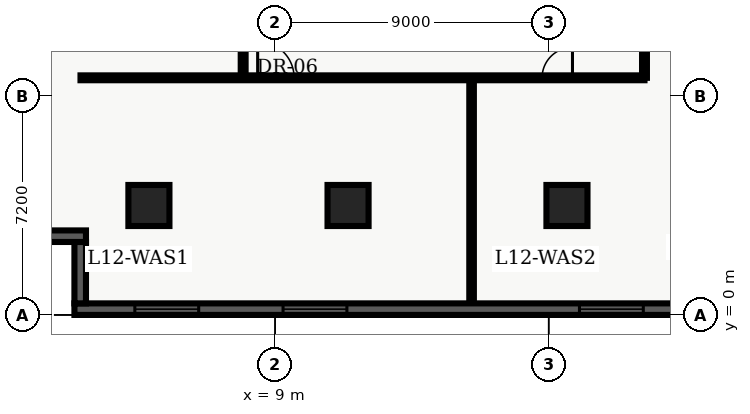
"""IFC4 building model, lengths in metres.
Left out: names, types, materials, properties, quantities, classifications, styles, units other than length and angle.
Written with IfcOpenShell. Run it as: python <this file> out.ifc"""

import sys

from ifc_helpers import new_model, entity, si_unit, converted_unit, direction, frame, origin_with_axes, origin_2d_with_axis, place, context, subcontext, project, spatial, polyline, rectangle, outline, extrude, element, fill, save


model = new_model("IFC4")
c1 = context("Model", 3, precision=1e-05, world=origin_with_axes(), true_north=direction((0.0, 1.0)))
c2 = subcontext(c1, "Body", "Model", "MODEL_VIEW")
j1 = project(units=[si_unit("LENGTHUNIT", "METRE"), converted_unit("PLANEANGLEUNIT", "DEGREE", entity("IfcPlaneAngleMeasure", 0.017), si_unit("PLANEANGLEUNIT", "RADIAN"), dimensions=[0, 0, 0, 0, 0, 0, 0])], contexts=[c1])
p1 = place(None, origin_with_axes())
s1 = spatial("IfcSite", under=j1, at=p1, CompositionType="ELEMENT")
p2 = place(p1, origin_with_axes())
s2 = spatial("IfcBuilding", under=s1, at=p2, CompositionType="ELEMENT")
p3 = place(p2, frame((0.0, 0.0, 52.2), z_axis=(0.0, 0.0, 1.0), x_axis=(1.0, 0.0, 0.0)))
s3 = spatial("IfcBuildingStorey", under=s2, at=p3, CompositionType="ELEMENT", Elevation=52.2)
for number, where, z_axis, x_axis in (
    (1, (11.4, 3.6, 0.0), (0.0, 0.0, 1.0), (1.0, 0.0, 0.0)),
    (2, (18.6, 3.6, 0.0), (0.0, 0.0, 1.0), (1.0, 0.0, 0.0)),
    (3, (4.85, 3.6, 0.0), (0.0, 0.0, 1.0), (1.0, 0.0, 0.0)),
):
    element("IfcColumn", number, at=place(p3, frame(where, z_axis=z_axis, x_axis=x_axis)), inside=s3, PredefinedType="COLUMN", context=c2, shape_type="SweptSolid", body=[
        extrude(rectangle(XDim=1.35, YDim=1.35, at=origin_2d_with_axis()), origin_with_axes(), (0.0, 0.0, 1.0), 3.9),
    ])
p4 = place(p3, frame((2.6, 7.8, 0.0), z_axis=(0.0, 0.0, 1.0), x_axis=(1.0, 0.0, 0.0)))
e4 = element("IfcWall", 4, at=p4, inside=s3, PredefinedType="PARTITIONING", context=c2, shape_type="SweptSolid", body=[
    extrude(outline(polyline([(0.0, -0.08), (18.55, -0.08), (18.55, 0.08), (0.0, 0.08), (0.0, -0.08)])), origin_with_axes(), (0.0, 0.0, 1.0), 2.7),
])
p5 = place(p4, frame((6.426, 0.0, 0.0), z_axis=(0.0, 0.0, 1.0), x_axis=(1.0, 0.0, 0.0)))
e5 = element("IfcOpeningElement", 5, at=p5, cuts=e4, PredefinedType="OPENING", context=c2, shape_type="SweptSolid", body=[
    extrude(rectangle(XDim=1.2, YDim=0.18, at=origin_2d_with_axis()), origin_with_axes(), (0.0, 0.0, 1.0), 2.2),
])
p6 = place(p4, frame((15.681, 0.0, 0.0), z_axis=(0.0, 0.0, 1.0), x_axis=(1.0, 0.0, 0.0)))
e6 = element("IfcOpeningElement", 6, at=p6, cuts=e4, PredefinedType="OPENING", context=c2, shape_type="SweptSolid", body=[
    extrude(rectangle(XDim=1.0, YDim=0.18, at=origin_2d_with_axis()), origin_with_axes(), (0.0, 0.0, 1.0), 2.15),
])
p7 = place(p3, frame((21.15, 7.8, 0.0), z_axis=(0.0, 0.0, 1.0), x_axis=(0.0, 1.0, 0.0)))
e7 = element("IfcWall", 7, at=p7, inside=s3, PredefinedType="PARTITIONING", context=c2, shape_type="SweptSolid", body=[
    extrude(outline(polyline([(0.0, -0.08), (32.7, -0.08), (32.7, 0.08), (0.0, 0.08), (0.0, -0.08)])), origin_with_axes(), (0.0, 0.0, 1.0), 2.7),
])
p8 = place(p7, frame((6.675, 0.0, 0.0), z_axis=(0.0, 0.0, 1.0), x_axis=(1.0, 0.0, 0.0)))
e8 = element("IfcOpeningElement", 8, at=p8, cuts=e7, PredefinedType="OPENING", context=c2, shape_type="SweptSolid", body=[
    extrude(rectangle(XDim=1.05, YDim=0.18, at=origin_2d_with_axis()), origin_with_axes(), (0.0, 0.0, 1.0), 2.15),
])
p9 = place(p3, frame((7.95, 7.8, 0.0), z_axis=(0.0, 0.0, 1.0), x_axis=(0.0, 1.0, 0.0)))
e9 = element("IfcWall", 9, at=p9, inside=s3, PredefinedType="PARTITIONING", context=c2, shape_type="SweptSolid", body=[
    extrude(outline(polyline([(0.0, -0.08), (32.7, -0.08), (32.7, 0.08), (0.0, 0.08), (0.0, -0.08)])), origin_with_axes(), (0.0, 0.0, 1.0), 2.7),
])
p10 = place(p9, frame((2.288, 0.0, 0.0), z_axis=(0.0, 0.0, 1.0), x_axis=(1.0, 0.0, 0.0)))
e10 = element("IfcOpeningElement", 10, at=p10, cuts=e9, PredefinedType="OPENING", context=c2, shape_type="SweptSolid", body=[
    extrude(rectangle(XDim=1.0, YDim=0.18, at=origin_2d_with_axis()), origin_with_axes(), (0.0, 0.0, 1.0), 2.15),
])
p11 = place(p9, frame((6.971, 0.0, 0.0), z_axis=(0.0, 0.0, 1.0), x_axis=(1.0, 0.0, 0.0)))
e11 = element("IfcOpeningElement", 11, at=p11, cuts=e9, PredefinedType="OPENING", context=c2, shape_type="SweptSolid", body=[
    extrude(rectangle(XDim=1.0, YDim=0.18, at=origin_2d_with_axis()), origin_with_axes(), (0.0, 0.0, 1.0), 2.15),
])
p12 = place(p9, frame((12.598, 0.0, 0.0), z_axis=(0.0, 0.0, 1.0), x_axis=(1.0, 0.0, 0.0)))
e12 = element("IfcOpeningElement", 12, at=p12, cuts=e9, PredefinedType="OPENING", context=c2, shape_type="SweptSolid", body=[
    extrude(rectangle(XDim=1.0, YDim=0.18, at=origin_2d_with_axis()), origin_with_axes(), (0.0, 0.0, 1.0), 2.15),
])
p13 = place(p9, frame((19.386, 0.0, 0.0), z_axis=(0.0, 0.0, 1.0), x_axis=(1.0, 0.0, 0.0)))
e13 = element("IfcOpeningElement", 13, at=p13, cuts=e9, PredefinedType="OPENING", context=c2, shape_type="SweptSolid", body=[
    extrude(rectangle(XDim=1.0, YDim=0.18, at=origin_2d_with_axis()), origin_with_axes(), (0.0, 0.0, 1.0), 2.15),
])
p14 = place(p9, frame((27.82, 0.0, 0.0), z_axis=(0.0, 0.0, 1.0), x_axis=(1.0, 0.0, 0.0)))
e14 = element("IfcOpeningElement", 14, at=p14, cuts=e9, PredefinedType="OPENING", context=c2, shape_type="SweptSolid", body=[
    extrude(rectangle(XDim=1.0, YDim=0.18, at=origin_2d_with_axis()), origin_with_axes(), (0.0, 0.0, 1.0), 2.15),
])
p15 = place(p3, frame((15.463, 0.36, 0.0), z_axis=(0.0, 0.0, 1.0), x_axis=(0.0, 1.0, 0.0)))
e15 = element("IfcWall", 15, at=p15, inside=s3, PredefinedType="PARTITIONING", context=c2, shape_type="SweptSolid", body=[
    extrude(outline(polyline([(0.0, -0.075), (7.34, -0.075), (7.34, 0.075), (0.0, 0.075), (0.0, -0.075)])), origin_with_axes(), (0.0, 0.0, 1.0), 2.7),
])
p16 = place(p3, frame((57.22, 0.19, 0.0), z_axis=(0.0, 0.0, 1.0), x_axis=(-1.0, 0.0, 0.0)))
e16 = element("IfcWall", 16, at=p16, inside=s3, PredefinedType="SOLIDWALL", context=c2, shape_type="SweptSolid", body=[
    extrude(outline(polyline([(0.0, -0.19), (54.82, -0.19), (54.82, 0.19), (0.0, 0.19), (0.0, -0.19)])), origin_with_axes(), (0.0, 0.0, 1.0), 3.66),
])
p17 = place(p16, frame((3.037, 0.0, 0.45), z_axis=(0.0, 0.0, 1.0), x_axis=(1.0, 0.0, 0.0)))
e17 = element("IfcOpeningElement", 17, at=p17, cuts=e16, PredefinedType="OPENING", context=c2, shape_type="SweptSolid", body=[
    extrude(rectangle(XDim=2.1, YDim=0.4, at=origin_2d_with_axis()), origin_with_axes(), (0.0, 0.0, 1.0), 2.2),
])
p18 = place(p16, frame((7.912, 0.0, 0.45), z_axis=(0.0, 0.0, 1.0), x_axis=(1.0, 0.0, 0.0)))
e18 = element("IfcOpeningElement", 18, at=p18, cuts=e16, PredefinedType="OPENING", context=c2, shape_type="SweptSolid", body=[
    extrude(rectangle(XDim=2.1, YDim=0.4, at=origin_2d_with_axis()), origin_with_axes(), (0.0, 0.0, 1.0), 2.2),
])
p19 = place(p16, frame((12.786, 0.0, 0.45), z_axis=(0.0, 0.0, 1.0), x_axis=(1.0, 0.0, 0.0)))
e19 = element("IfcOpeningElement", 19, at=p19, cuts=e16, PredefinedType="OPENING", context=c2, shape_type="SweptSolid", body=[
    extrude(rectangle(XDim=2.1, YDim=0.4, at=origin_2d_with_axis()), origin_with_axes(), (0.0, 0.0, 1.0), 2.2),
])
p20 = place(p16, frame((17.661, 0.0, 0.45), z_axis=(0.0, 0.0, 1.0), x_axis=(1.0, 0.0, 0.0)))
e20 = element("IfcOpeningElement", 20, at=p20, cuts=e16, PredefinedType="OPENING", context=c2, shape_type="SweptSolid", body=[
    extrude(rectangle(XDim=2.1, YDim=0.4, at=origin_2d_with_axis()), origin_with_axes(), (0.0, 0.0, 1.0), 2.2),
])
p21 = place(p16, frame((22.535, 0.0, 0.45), z_axis=(0.0, 0.0, 1.0), x_axis=(1.0, 0.0, 0.0)))
e21 = element("IfcOpeningElement", 21, at=p21, cuts=e16, PredefinedType="OPENING", context=c2, shape_type="SweptSolid", body=[
    extrude(rectangle(XDim=2.1, YDim=0.4, at=origin_2d_with_axis()), origin_with_axes(), (0.0, 0.0, 1.0), 2.2),
])
p22 = place(p16, frame((27.41, 0.0, 0.45), z_axis=(0.0, 0.0, 1.0), x_axis=(1.0, 0.0, 0.0)))
e22 = element("IfcOpeningElement", 22, at=p22, cuts=e16, PredefinedType="OPENING", context=c2, shape_type="SweptSolid", body=[
    extrude(rectangle(XDim=2.1, YDim=0.4, at=origin_2d_with_axis()), origin_with_axes(), (0.0, 0.0, 1.0), 2.2),
])
p23 = place(p16, frame((32.285, 0.0, 0.45), z_axis=(0.0, 0.0, 1.0), x_axis=(1.0, 0.0, 0.0)))
e23 = element("IfcOpeningElement", 23, at=p23, cuts=e16, PredefinedType="OPENING", context=c2, shape_type="SweptSolid", body=[
    extrude(rectangle(XDim=2.1, YDim=0.4, at=origin_2d_with_axis()), origin_with_axes(), (0.0, 0.0, 1.0), 2.2),
])
p24 = place(p16, frame((37.159, 0.0, 0.45), z_axis=(0.0, 0.0, 1.0), x_axis=(1.0, 0.0, 0.0)))
e24 = element("IfcOpeningElement", 24, at=p24, cuts=e16, PredefinedType="OPENING", context=c2, shape_type="SweptSolid", body=[
    extrude(rectangle(XDim=2.1, YDim=0.4, at=origin_2d_with_axis()), origin_with_axes(), (0.0, 0.0, 1.0), 2.2),
])
p25 = place(p16, frame((46.908, 0.0, 0.45), z_axis=(0.0, 0.0, 1.0), x_axis=(1.0, 0.0, 0.0)))
e25 = element("IfcOpeningElement", 25, at=p25, cuts=e16, PredefinedType="OPENING", context=c2, shape_type="SweptSolid", body=[
    extrude(rectangle(XDim=2.1, YDim=0.4, at=origin_2d_with_axis()), origin_with_axes(), (0.0, 0.0, 1.0), 2.2),
])
p26 = place(p16, frame((51.783, 0.0, 0.45), z_axis=(0.0, 0.0, 1.0), x_axis=(1.0, 0.0, 0.0)))
e26 = element("IfcOpeningElement", 26, at=p26, cuts=e16, PredefinedType="OPENING", context=c2, shape_type="SweptSolid", body=[
    extrude(rectangle(XDim=2.1, YDim=0.4, at=origin_2d_with_axis()), origin_with_axes(), (0.0, 0.0, 1.0), 2.2),
])
p27 = place(p3, frame((2.59, 0.38, 0.0), z_axis=(0.0, 0.0, 1.0), x_axis=(0.0, 1.0, 0.0)))
e27 = element("IfcWall", 27, at=p27, inside=s3, PredefinedType="SOLIDWALL", context=c2, shape_type="SweptSolid", body=[
    extrude(outline(polyline([(0.0, -0.19), (2.02, -0.19), (2.02, 0.19), (0.0, 0.19), (0.0, -0.19)])), origin_with_axes(), (0.0, 0.0, 1.0), 3.66),
])
p28 = place(p3, frame((2.78, 2.59, 0.0), z_axis=(0.0, 0.0, 1.0), x_axis=(-1.0, 0.0, 0.0)))
e28 = element("IfcWall", 28, at=p28, inside=s3, PredefinedType="SOLIDWALL", context=c2, shape_type="SweptSolid", body=[
    extrude(outline(polyline([(0.0, -0.19), (2.78, -0.19), (2.78, 0.19), (0.0, 0.19), (0.0, -0.19)])), origin_with_axes(), (0.0, 0.0, 1.0), 3.66),
])
p29 = place(p4, frame((6.426, 0.0, 0.0), z_axis=(0.0, 0.0, 1.0), x_axis=(1.0, 0.0, 0.0)))
e29 = element("IfcDoor", 29, at=p29, inside=s3, OperationType="SINGLE_SWING_LEFT", PredefinedType="DOOR", context=c2, shape_type="SweptSolid", body=[
    extrude(rectangle(XDim=1.2, YDim=0.09, at=origin_2d_with_axis()), origin_with_axes(), (0.0, 0.0, 1.0), 2.2),
])
fill(e5, e29)
p30 = place(p4, frame((15.681, 0.0, 0.0), z_axis=(0.0, 0.0, 1.0), x_axis=(1.0, 0.0, 0.0)))
e30 = element("IfcDoor", 30, at=p30, inside=s3, OperationType="SINGLE_SWING_RIGHT", PredefinedType="DOOR", context=c2, shape_type="SweptSolid", body=[
    extrude(rectangle(XDim=1.0, YDim=0.09, at=origin_2d_with_axis()), origin_with_axes(), (0.0, 0.0, 1.0), 2.15),
])
fill(e6, e30)
p31 = place(p16, frame((37.159, 0.0, 0.45), z_axis=(0.0, 0.0, 1.0), x_axis=(1.0, 0.0, 0.0)))
e31 = element("IfcWindow", 31, at=p31, inside=s3, PredefinedType="WINDOW", context=c2, shape_type="SweptSolid", body=[
    extrude(rectangle(XDim=2.1, YDim=0.09, at=origin_2d_with_axis()), origin_with_axes(), (0.0, 0.0, 1.0), 2.2),
])
fill(e24, e31)
p32 = place(p16, frame((46.908, 0.0, 0.45), z_axis=(0.0, 0.0, 1.0), x_axis=(1.0, 0.0, 0.0)))
e32 = element("IfcWindow", 32, at=p32, inside=s3, PredefinedType="WINDOW", context=c2, shape_type="SweptSolid", body=[
    extrude(rectangle(XDim=2.1, YDim=0.09, at=origin_2d_with_axis()), origin_with_axes(), (0.0, 0.0, 1.0), 2.2),
])
fill(e25, e32)
p33 = place(p16, frame((51.783, 0.0, 0.45), z_axis=(0.0, 0.0, 1.0), x_axis=(1.0, 0.0, 0.0)))
e33 = element("IfcWindow", 33, at=p33, inside=s3, PredefinedType="WINDOW", context=c2, shape_type="SweptSolid", body=[
    extrude(rectangle(XDim=2.1, YDim=0.09, at=origin_2d_with_axis()), origin_with_axes(), (0.0, 0.0, 1.0), 2.2),
])
fill(e26, e33)
save(model, sys.argv[1])
